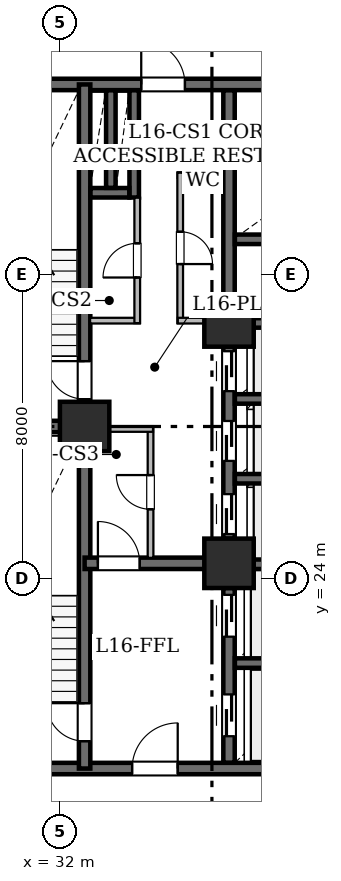
"""IFC4 building model, lengths in metres.
Left out: names, types, materials, properties, quantities, classifications, styles, units other than length and angle.
Written with IfcOpenShell. Run it as: python <this file> out.ifc"""

import sys

from ifc_helpers import new_model, si_unit, direction, frame, frame_2d, origin, origin_2d, place, context, subcontext, project, spatial, rectangle, hollow_rectangle, extrude, element, fill, save


model = new_model("IFC4")
c1 = context("Model", 3, precision=1e-05, world=origin(), true_north=direction((0.0, 1.0)))
c2 = subcontext(c1, "Body", "Model", "MODEL_VIEW")
j1 = project(units=[si_unit("LENGTHUNIT", "METRE"), si_unit("PLANEANGLEUNIT", "RADIAN")], contexts=[c1])
p1 = place(None, origin())
s1 = spatial("IfcSite", under=j1, at=p1, CompositionType="ELEMENT")
p2 = place(p1, origin())
s2 = spatial("IfcBuilding", under=s1, at=p2, CompositionType="ELEMENT")
p3 = place(p2, frame((0.0, 0.0, 66.15)))
s3 = spatial("IfcBuildingStorey", under=s2, at=p3, CompositionType="ELEMENT", Elevation=66.15)
for number, where, z_axis, x_axis in (
    (1, (32.65, 28.0, 0.0), (0.0, 0.0, 1.0), (1.0, 0.0, 0.0)),
    (2, (36.45, 24.4, 0.0), (0.0, 0.0, 1.0), (1.0, 0.0, 0.0)),
    (3, (36.45, 30.75, 0.0), (0.0, 0.0, 1.0), (1.0, 0.0, 0.0)),
):
    element("IfcColumn", number, at=place(p3, frame(where, z_axis=z_axis, x_axis=x_axis)), inside=s3, PredefinedType="COLUMN", context=c2, shape_type="SweptSolid", body=[
        extrude(hollow_rectangle(XDim=1.3, YDim=1.3, WallThickness=0.065, at=origin_2d()), origin(), (0.0, 0.0, 1.0), 3.65),
    ])
p4 = place(p3, frame((29.0, 19.0, 0.0), z_axis=(0.0, 0.0, 1.0), x_axis=(1.0, 0.0, 0.0)))
e4 = element("IfcWall", 4, at=p4, inside=s3, PredefinedType="SHEAR", context=c2, shape_type="SweptSolid", body=[
    extrude(rectangle(XDim=10.4, YDim=0.3, at=frame_2d((5.2, 0.0))), origin(), (0.0, 0.0, 1.0), 3.43),
])
p5 = place(p4, frame((4.9, 0.0, 0.0)))
e5 = element("IfcOpeningElement", 5, at=p5, cuts=e4, PredefinedType="OPENING", context=c2, shape_type="SweptSolid", body=[
    extrude(rectangle(XDim=1.2, YDim=2.15, at=frame_2d((0.6, 1.075))), frame((0.0, 0.16, 0.0), z_axis=(0.0, -1.0, 0.0), x_axis=(1.0, 0.0, 0.0)), (0.0, 0.0, 1.0), 0.32),
])
p6 = place(p3, frame((29.0, 37.0, 0.0), z_axis=(0.0, 0.0, 1.0), x_axis=(1.0, 0.0, 0.0)))
e6 = element("IfcWall", 6, at=p6, inside=s3, PredefinedType="SHEAR", context=c2, shape_type="SweptSolid", body=[
    extrude(rectangle(XDim=10.4, YDim=0.3, at=frame_2d((5.2, 0.0))), origin(), (0.0, 0.0, 1.0), 3.43),
])
p7 = place(p6, frame((5.14, 0.0, 0.0)))
e7 = element("IfcOpeningElement", 7, at=p7, cuts=e6, PredefinedType="OPENING", context=c2, shape_type="SweptSolid", body=[
    extrude(rectangle(XDim=1.15, YDim=2.2, at=frame_2d((0.575, 1.1))), frame((0.0, 0.16, 0.0), z_axis=(0.0, -1.0, 0.0), x_axis=(1.0, 0.0, 0.0)), (0.0, 0.0, 1.0), 0.32),
])
p8 = place(p3, frame((32.65, 19.0, 0.0), z_axis=(0.0, 0.0, 1.0), x_axis=(0.0, 1.0, 0.0)))
e8 = element("IfcWall", 8, at=p8, inside=s3, PredefinedType="SHEAR", context=c2, shape_type="SweptSolid", body=[
    extrude(rectangle(XDim=9.0, YDim=0.3, at=frame_2d((4.5, 0.0))), origin(), (0.0, 0.0, 1.0), 3.43),
])
p9 = place(p8, frame((0.72, 0.0, 0.0)))
e9 = element("IfcOpeningElement", 9, at=p9, cuts=e8, PredefinedType="OPENING", context=c2, shape_type="SweptSolid", body=[
    extrude(rectangle(XDim=1.0, YDim=2.15, at=frame_2d((0.5, 1.075))), frame((0.0, 0.16, 0.0), z_axis=(0.0, -1.0, 0.0), x_axis=(1.0, 0.0, 0.0)), (0.0, 0.0, 1.0), 0.32),
])
p10 = place(p3, frame((32.65, 28.0, 0.0), z_axis=(0.0, 0.0, 1.0), x_axis=(0.0, 1.0, 0.0)))
e10 = element("IfcWall", 10, at=p10, inside=s3, PredefinedType="SHEAR", context=c2, shape_type="SweptSolid", body=[
    extrude(rectangle(XDim=9.0, YDim=0.3, at=frame_2d((4.5, 0.0))), origin(), (0.0, 0.0, 1.0), 3.43),
])
p11 = place(p10, frame((0.72, 0.0, 0.0)))
e11 = element("IfcOpeningElement", 11, at=p11, cuts=e10, PredefinedType="OPENING", context=c2, shape_type="SweptSolid", body=[
    extrude(rectangle(XDim=1.0, YDim=2.15, at=frame_2d((0.5, 1.075))), frame((0.0, 0.16, 0.0), z_axis=(0.0, -1.0, 0.0), x_axis=(1.0, 0.0, 0.0)), (0.0, 0.0, 1.0), 0.32),
])
p12 = place(p3, frame((29.0, 28.0, 0.0), z_axis=(0.0, 0.0, 1.0), x_axis=(1.0, 0.0, 0.0)))
e12 = element("IfcWall", 12, at=p12, inside=s3, PredefinedType="SHEAR", context=c2, shape_type="SweptSolid", body=[
    extrude(rectangle(XDim=3.65, YDim=0.3, at=frame_2d((1.825, 0.0))), origin(), (0.0, 0.0, 1.0), 3.43),
])
p13 = place(p3, frame((32.65, 24.4, 0.0), z_axis=(0.0, 0.0, 1.0), x_axis=(1.0, 0.0, 0.0)))
e13 = element("IfcWall", 13, at=p13, inside=s3, PredefinedType="SHEAR", context=c2, shape_type="SweptSolid", body=[
    extrude(rectangle(XDim=3.8, YDim=0.3, at=frame_2d((1.9, 0.0))), origin(), (0.0, 0.0, 1.0), 3.43),
])
p14 = place(p13, frame((0.35, 0.0, 0.0)))
e14 = element("IfcOpeningElement", 14, at=p14, cuts=e13, PredefinedType="OPENING", context=c2, shape_type="SweptSolid", body=[
    extrude(rectangle(XDim=1.1, YDim=2.15, at=frame_2d((0.55, 1.075))), frame((0.0, 0.16, 0.0), z_axis=(0.0, -1.0, 0.0), x_axis=(1.0, 0.0, 0.0)), (0.0, 0.0, 1.0), 0.32),
])
p15 = place(p3, frame((36.45, 19.154, 0.0), z_axis=(0.0, 0.0, 1.0), x_axis=(0.0, 1.0, 0.0)))
e15 = element("IfcWall", 15, at=p15, inside=s3, PredefinedType="SHEAR", context=c2, shape_type="SweptSolid", body=[
    extrude(rectangle(XDim=4.596, YDim=0.3, at=frame_2d((2.298, 0.0))), origin(), (0.0, 0.0, 1.0), 3.43),
])
p16 = place(p15, frame((0.696, 0.0, 0.0)))
e16 = element("IfcOpeningElement", 16, at=p16, cuts=e15, PredefinedType="OPENING", context=c2, shape_type="SweptSolid", body=[
    extrude(rectangle(XDim=1.1, YDim=2.15, at=frame_2d((0.55, 1.075))), frame((0.0, 0.16, 0.0), z_axis=(0.0, -1.0, 0.0), x_axis=(1.0, 0.0, 0.0)), (0.0, 0.0, 1.0), 0.32),
])
p17 = place(p15, frame((3.316, 0.0, 0.0)))
e17 = element("IfcOpeningElement", 17, at=p17, cuts=e15, PredefinedType="OPENING", context=c2, shape_type="SweptSolid", body=[
    extrude(rectangle(XDim=1.1, YDim=2.15, at=frame_2d((0.55, 1.075))), frame((0.0, 0.16, 0.0), z_axis=(0.0, -1.0, 0.0), x_axis=(1.0, 0.0, 0.0)), (0.0, 0.0, 1.0), 0.32),
])
p18 = place(p3, frame((36.45, 25.05, 0.0), z_axis=(0.0, 0.0, 1.0), x_axis=(0.0, 1.0, 0.0)))
e18 = element("IfcWall", 18, at=p18, inside=s3, PredefinedType="SHEAR", context=c2, shape_type="SweptSolid", body=[
    extrude(rectangle(XDim=5.05, YDim=0.3, at=frame_2d((2.525, 0.0))), origin(), (0.0, 0.0, 1.0), 3.43),
])
p19 = place(p18, frame((0.12, 0.0, 0.0)))
e19 = element("IfcOpeningElement", 19, at=p19, cuts=e18, PredefinedType="OPENING", context=c2, shape_type="SweptSolid", body=[
    extrude(rectangle(XDim=1.05, YDim=2.15, at=frame_2d((0.525, 1.075))), frame((0.0, 0.16, 0.0), z_axis=(0.0, -1.0, 0.0), x_axis=(1.0, 0.0, 0.0)), (0.0, 0.0, 1.0), 0.32),
])
p20 = place(p18, frame((2.045, 0.0, 0.0)))
e20 = element("IfcOpeningElement", 20, at=p20, cuts=e18, PredefinedType="OPENING", context=c2, shape_type="SweptSolid", body=[
    extrude(rectangle(XDim=1.05, YDim=2.15, at=frame_2d((0.525, 1.075))), frame((0.0, 0.16, 0.0), z_axis=(0.0, -1.0, 0.0), x_axis=(1.0, 0.0, 0.0)), (0.0, 0.0, 1.0), 0.32),
])
p21 = place(p18, frame((3.88, 0.0, 0.0)))
e21 = element("IfcOpeningElement", 21, at=p21, cuts=e18, PredefinedType="OPENING", context=c2, shape_type="SweptSolid", body=[
    extrude(rectangle(XDim=1.05, YDim=2.15, at=frame_2d((0.525, 1.075))), frame((0.0, 0.16, 0.0), z_axis=(0.0, -1.0, 0.0), x_axis=(1.0, 0.0, 0.0)), (0.0, 0.0, 1.0), 0.32),
])
p22 = place(p3, frame((36.45, 31.4, 0.0), z_axis=(0.0, 0.0, 1.0), x_axis=(0.0, 1.0, 0.0)))
e22 = element("IfcWall", 22, at=p22, inside=s3, PredefinedType="SHEAR", context=c2, shape_type="SweptSolid", body=[
    extrude(rectangle(XDim=5.446, YDim=0.3, at=frame_2d((2.723, 0.0))), origin(), (0.0, 0.0, 1.0), 3.43),
])
for number, where, z_axis, x_axis in (
    (23, (36.604, 21.775, 0.0), (0.0, 0.0, 1.0), (1.0, 0.0, 0.0)),
    (24, (36.604, 24.375, 0.0), (0.0, 0.0, 1.0), (1.0, 0.0, 0.0)),
    (25, (36.604, 26.625, 0.0), (0.0, 0.0, 1.0), (1.0, 0.0, 0.0)),
    (26, (36.604, 28.725, 0.0), (0.0, 0.0, 1.0), (1.0, 0.0, 0.0)),
    (27, (36.604, 30.725, 0.0), (0.0, 0.0, 1.0), (1.0, 0.0, 0.0)),
    (28, (36.604, 32.925, 0.0), (0.0, 0.0, 1.0), (1.0, 0.0, 0.0)),
    (29, (36.604, 34.975, 0.0), (0.0, 0.0, 1.0), (1.0, 0.0, 0.0)),
):
    element("IfcWall", number, at=place(p3, frame(where, z_axis=z_axis, x_axis=x_axis)), inside=s3, PredefinedType="SHEAR", context=c2, shape_type="SweptSolid", body=[
        extrude(rectangle(XDim=2.642, YDim=0.25, at=frame_2d((1.321, 0.0))), origin(), (0.0, 0.0, 1.0), 3.43),
    ])
p23 = place(p3, frame((33.955, 34.025, 0.0), z_axis=(0.0, 0.0, 1.0), x_axis=(0.0, 1.0, 0.0)))
e30 = element("IfcWall", 30, at=p23, inside=s3, PredefinedType="SHEAR", context=c2, shape_type="SweptSolid", body=[
    extrude(rectangle(XDim=2.821, YDim=0.25, at=frame_2d((1.411, 0.0))), origin(), (0.0, 0.0, 1.0), 3.43),
])
p24 = place(p3, frame((32.804, 34.15, 0.0), z_axis=(0.0, 0.0, 1.0), x_axis=(1.0, 0.0, 0.0)))
e31 = element("IfcWall", 31, at=p24, inside=s3, PredefinedType="SHEAR", context=c2, shape_type="SweptSolid", body=[
    extrude(rectangle(XDim=1.022, YDim=0.25, at=frame_2d((0.511, 0.0))), origin(), (0.0, 0.0, 1.0), 3.43),
])
p25 = place(p3, frame((33.34, 34.279, 0.0), z_axis=(0.0, 0.0, 1.0), x_axis=(0.0, 1.0, 0.0)))
e32 = element("IfcWall", 32, at=p25, inside=s3, PredefinedType="SHEAR", context=c2, shape_type="SweptSolid", body=[
    extrude(rectangle(XDim=2.567, YDim=0.25, at=frame_2d((1.283, 0.0))), origin(), (0.0, 0.0, 1.0), 3.43),
])
p26 = place(p3, frame((36.306, 34.615, 0.0), z_axis=(0.0, 0.0, 1.0), x_axis=(-1.0, 0.0, 0.0)))
e33 = element("IfcWall", 33, at=p26, inside=s3, PredefinedType="STANDARD", context=c2, shape_type="SweptSolid", body=[
    extrude(rectangle(XDim=1.206, YDim=0.15, at=frame_2d((0.603, 0.0))), origin(), (0.0, 0.0, 1.0), 3.43),
])
p27 = place(p3, frame((35.165, 34.678, 0.0), z_axis=(0.0, 0.0, 1.0), x_axis=(0.0, -1.0, 0.0)))
e34 = element("IfcWall", 34, at=p27, inside=s3, PredefinedType="STANDARD", context=c2, shape_type="SweptSolid", body=[
    extrude(rectangle(XDim=3.958, YDim=0.15, at=frame_2d((1.979, 0.0))), origin(), (0.0, 0.0, 1.0), 3.43),
])
p28 = place(p27, frame((1.554, 0.0, 0.0)))
e35 = element("IfcOpeningElement", 35, at=p28, cuts=e34, PredefinedType="OPENING", context=c2, shape_type="SweptSolid", body=[
    extrude(rectangle(XDim=0.85, YDim=2.1, at=frame_2d((0.425, 1.05))), frame((0.0, 0.085, 0.0), z_axis=(0.0, -1.0, 0.0), x_axis=(1.0, 0.0, 0.0)), (0.0, 0.0, 1.0), 0.17),
])
p29 = place(p3, frame((35.102, 30.785, 0.0), z_axis=(0.0, 0.0, 1.0), x_axis=(1.0, 0.0, 0.0)))
e36 = element("IfcWall", 36, at=p29, inside=s3, PredefinedType="STANDARD", context=c2, shape_type="SweptSolid", body=[
    extrude(rectangle(XDim=1.198, YDim=0.15, at=frame_2d((0.599, 0.0))), origin(), (0.0, 0.0, 1.0), 3.43),
])
p30 = place(p3, frame((32.794, 30.785, 0.0), z_axis=(0.0, 0.0, 1.0), x_axis=(1.0, 0.0, 0.0)))
e37 = element("IfcWall", 37, at=p30, inside=s3, PredefinedType="STANDARD", context=c2, shape_type="SweptSolid", body=[
    extrude(rectangle(XDim=1.306, YDim=0.15, at=frame_2d((0.653, 0.0))), origin(), (0.0, 0.0, 1.0), 2.887),
])
p31 = place(p3, frame((34.035, 30.72, 0.0), z_axis=(0.0, 0.0, 1.0), x_axis=(0.0, 1.0, 0.0)))
e38 = element("IfcWall", 38, at=p31, inside=s3, PredefinedType="STANDARD", context=c2, shape_type="SweptSolid", body=[
    extrude(rectangle(XDim=3.3, YDim=0.15, at=frame_2d((1.65, 0.0))), origin(), (0.0, 0.0, 1.0), 3.43),
])
p32 = place(p31, frame((1.2, 0.0, 0.0)))
e39 = element("IfcOpeningElement", 39, at=p32, cuts=e38, PredefinedType="OPENING", context=c2, shape_type="SweptSolid", body=[
    extrude(rectangle(XDim=0.9, YDim=2.1, at=frame_2d((0.45, 1.05))), frame((0.0, 0.085, 0.0), z_axis=(0.0, -1.0, 0.0), x_axis=(1.0, 0.0, 0.0)), (0.0, 0.0, 1.0), 0.17),
])
p33 = place(p3, frame((34.385, 24.544, 0.0), z_axis=(0.0, 0.0, 1.0), x_axis=(0.0, 1.0, 0.0)))
e40 = element("IfcWall", 40, at=p33, inside=s3, PredefinedType="STANDARD", context=c2, shape_type="SweptSolid", body=[
    extrude(rectangle(XDim=3.456, YDim=0.15, at=frame_2d((1.728, 0.0))), origin(), (0.0, 0.0, 1.0), 3.43),
])
p34 = place(p33, frame((1.278, 0.0, 0.0)))
e41 = element("IfcOpeningElement", 41, at=p34, cuts=e40, PredefinedType="OPENING", context=c2, shape_type="SweptSolid", body=[
    extrude(rectangle(XDim=0.9, YDim=2.1, at=frame_2d((0.45, 1.05))), frame((0.0, 0.085, 0.0), z_axis=(0.0, -1.0, 0.0), x_axis=(1.0, 0.0, 0.0)), (0.0, 0.0, 1.0), 0.17),
])
p35 = place(p3, frame((34.45, 27.935, 0.0), z_axis=(0.0, 0.0, 1.0), x_axis=(-1.0, 0.0, 0.0)))
e42 = element("IfcWall", 42, at=p35, inside=s3, PredefinedType="STANDARD", context=c2, shape_type="SweptSolid", body=[
    extrude(rectangle(XDim=1.656, YDim=0.15, at=frame_2d((0.828, 0.0))), origin(), (0.0, 0.0, 1.0), 2.887),
])
p36 = place(p9, origin())
e43 = element("IfcDoor", 43, at=p36, inside=s3, OperationType="SINGLE_SWING_RIGHT", PredefinedType="DOOR", context=c2, shape_type="SweptSolid", body=[
    extrude(rectangle(XDim=1.0, YDim=2.15, at=frame_2d((0.5, 1.075))), frame((0.0, 0.025, 0.0), z_axis=(0.0, -1.0, 0.0), x_axis=(1.0, 0.0, 0.0)), (0.0, 0.0, 1.0), 0.05),
])
fill(e9, e43)
p37 = place(p11, origin())
e44 = element("IfcDoor", 44, at=p37, inside=s3, OperationType="SINGLE_SWING_RIGHT", PredefinedType="DOOR", context=c2, shape_type="SweptSolid", body=[
    extrude(rectangle(XDim=1.0, YDim=2.15, at=frame_2d((0.5, 1.075))), frame((0.0, 0.025, 0.0), z_axis=(0.0, -1.0, 0.0), x_axis=(1.0, 0.0, 0.0)), (0.0, 0.0, 1.0), 0.05),
])
fill(e11, e44)
p38 = place(p14, origin())
e45 = element("IfcDoor", 45, at=p38, inside=s3, OperationType="SINGLE_SWING_LEFT", PredefinedType="DOOR", context=c2, shape_type="SweptSolid", body=[
    extrude(rectangle(XDim=1.1, YDim=2.15, at=frame_2d((0.55, 1.075))), frame((0.0, 0.025, 0.0), z_axis=(0.0, -1.0, 0.0), x_axis=(1.0, 0.0, 0.0)), (0.0, 0.0, 1.0), 0.05),
])
fill(e14, e45)
p39 = place(p5, origin())
e46 = element("IfcDoor", 46, at=p39, inside=s3, OperationType="SINGLE_SWING_RIGHT", PredefinedType="DOOR", context=c2, shape_type="SweptSolid", body=[
    extrude(rectangle(XDim=1.2, YDim=2.15, at=frame_2d((0.6, 1.075))), frame((0.0, 0.025, 0.0), z_axis=(0.0, -1.0, 0.0), x_axis=(1.0, 0.0, 0.0)), (0.0, 0.0, 1.0), 0.05),
])
fill(e5, e46)
p40 = place(p7, origin())
e47 = element("IfcDoor", 47, at=p40, inside=s3, OperationType="SINGLE_SWING_LEFT", PredefinedType="DOOR", context=c2, shape_type="SweptSolid", body=[
    extrude(rectangle(XDim=1.15, YDim=2.2, at=frame_2d((0.575, 1.1))), frame((0.0, 0.025, 0.0), z_axis=(0.0, -1.0, 0.0), x_axis=(1.0, 0.0, 0.0)), (0.0, 0.0, 1.0), 0.05),
])
fill(e7, e47)
p41 = place(p16, origin())
e48 = element("IfcDoor", 48, at=p41, inside=s3, OperationType="SLIDING_TO_LEFT", PredefinedType="DOOR", context=c2, shape_type="SweptSolid", body=[
    extrude(rectangle(XDim=1.1, YDim=2.15, at=frame_2d((0.55, 1.075))), frame((0.0, 0.025, 0.0), z_axis=(0.0, -1.0, 0.0), x_axis=(1.0, 0.0, 0.0)), (0.0, 0.0, 1.0), 0.05),
])
fill(e16, e48)
p42 = place(p17, origin())
e49 = element("IfcDoor", 49, at=p42, inside=s3, OperationType="SLIDING_TO_LEFT", PredefinedType="DOOR", context=c2, shape_type="SweptSolid", body=[
    extrude(rectangle(XDim=1.1, YDim=2.15, at=frame_2d((0.55, 1.075))), frame((0.0, 0.025, 0.0), z_axis=(0.0, -1.0, 0.0), x_axis=(1.0, 0.0, 0.0)), (0.0, 0.0, 1.0), 0.05),
])
fill(e17, e49)
p43 = place(p19, origin())
e50 = element("IfcDoor", 50, at=p43, inside=s3, OperationType="SLIDING_TO_LEFT", PredefinedType="DOOR", context=c2, shape_type="SweptSolid", body=[
    extrude(rectangle(XDim=1.05, YDim=2.15, at=frame_2d((0.525, 1.075))), frame((0.0, 0.025, 0.0), z_axis=(0.0, -1.0, 0.0), x_axis=(1.0, 0.0, 0.0)), (0.0, 0.0, 1.0), 0.05),
])
fill(e19, e50)
p44 = place(p20, origin())
e51 = element("IfcDoor", 51, at=p44, inside=s3, OperationType="SLIDING_TO_LEFT", PredefinedType="DOOR", context=c2, shape_type="SweptSolid", body=[
    extrude(rectangle(XDim=1.05, YDim=2.15, at=frame_2d((0.525, 1.075))), frame((0.0, 0.025, 0.0), z_axis=(0.0, -1.0, 0.0), x_axis=(1.0, 0.0, 0.0)), (0.0, 0.0, 1.0), 0.05),
])
fill(e20, e51)
p45 = place(p21, origin())
e52 = element("IfcDoor", 52, at=p45, inside=s3, OperationType="SLIDING_TO_LEFT", PredefinedType="DOOR", context=c2, shape_type="SweptSolid", body=[
    extrude(rectangle(XDim=1.05, YDim=2.15, at=frame_2d((0.525, 1.075))), frame((0.0, 0.025, 0.0), z_axis=(0.0, -1.0, 0.0), x_axis=(1.0, 0.0, 0.0)), (0.0, 0.0, 1.0), 0.05),
])
fill(e21, e52)
p46 = place(p28, origin())
e53 = element("IfcDoor", 53, at=p46, inside=s3, OperationType="SINGLE_SWING_RIGHT", PredefinedType="DOOR", context=c2, shape_type="SweptSolid", body=[
    extrude(rectangle(XDim=0.85, YDim=2.1, at=frame_2d((0.425, 1.05))), frame((0.0, 0.025, 0.0), z_axis=(0.0, -1.0, 0.0), x_axis=(1.0, 0.0, 0.0)), (0.0, 0.0, 1.0), 0.05),
])
fill(e35, e53)
p47 = place(p32, origin())
e54 = element("IfcDoor", 54, at=p47, inside=s3, OperationType="SINGLE_SWING_LEFT", PredefinedType="DOOR", context=c2, shape_type="SweptSolid", body=[
    extrude(rectangle(XDim=0.9, YDim=2.1, at=frame_2d((0.45, 1.05))), frame((0.0, 0.025, 0.0), z_axis=(0.0, -1.0, 0.0), x_axis=(1.0, 0.0, 0.0)), (0.0, 0.0, 1.0), 0.05),
])
fill(e39, e54)
p48 = place(p34, origin())
e55 = element("IfcDoor", 55, at=p48, inside=s3, OperationType="SINGLE_SWING_RIGHT", PredefinedType="DOOR", context=c2, shape_type="SweptSolid", body=[
    extrude(rectangle(XDim=0.9, YDim=2.1, at=frame_2d((0.45, 1.05))), frame((0.0, 0.025, 0.0), z_axis=(0.0, -1.0, 0.0), x_axis=(1.0, 0.0, 0.0)), (0.0, 0.0, 1.0), 0.05),
])
fill(e41, e55)
save(model, sys.argv[1])
